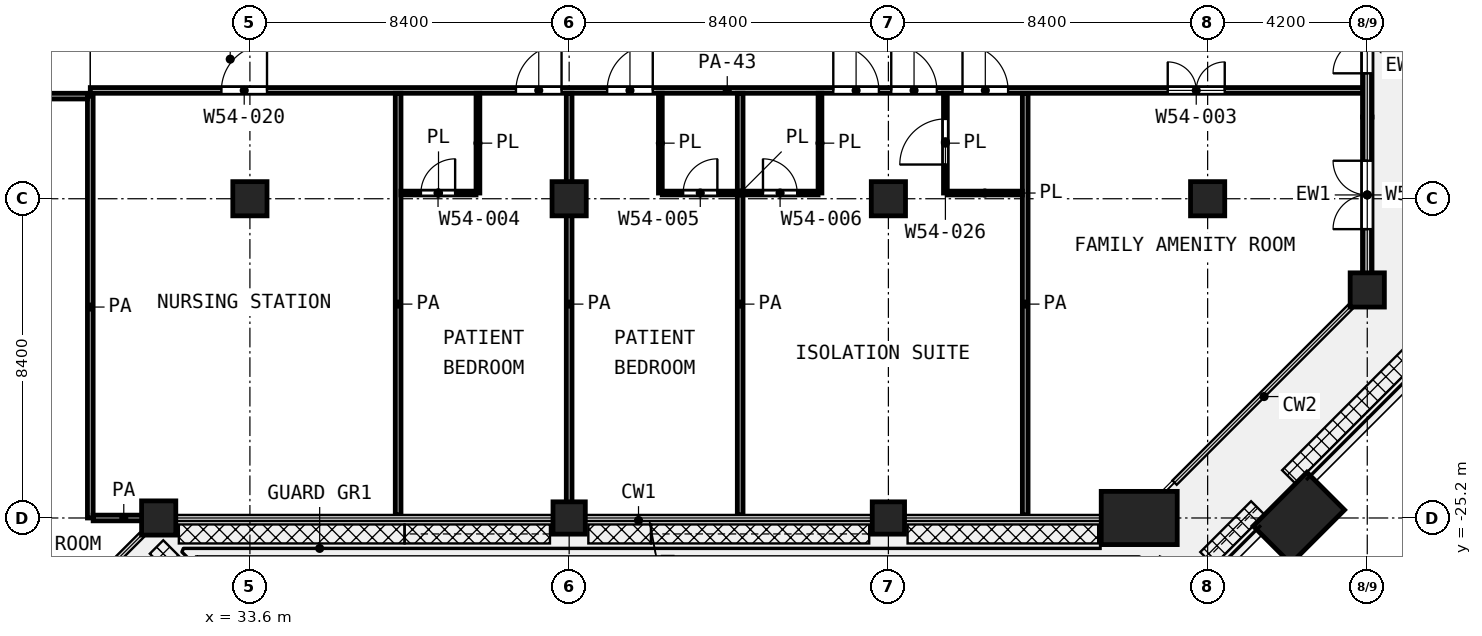
"""IFC4 building model, lengths in metres.
Left out: names, types, materials, properties, quantities, classifications, styles, units other than length and angle.
Written with IfcOpenShell. Run it as: python <this file> out.ifc"""

import sys

from ifc_helpers import new_model, si_unit, direction, frame, frame_2d, origin, origin_2d, place, context, subcontext, project, spatial, rectangle, extrude, element, fill, save


model = new_model("IFC4")
c1 = context("Model", 3, precision=1e-05, world=origin(), true_north=direction((0.0, 1.0)))
c2 = subcontext(c1, "Body", "Model", "MODEL_VIEW")
j1 = project(units=[si_unit("LENGTHUNIT", "METRE"), si_unit("PLANEANGLEUNIT", "RADIAN")], contexts=[c1])
p1 = place(None, origin())
s1 = spatial("IfcSite", under=j1, at=p1, CompositionType="ELEMENT")
p2 = place(p1, origin())
s2 = spatial("IfcBuilding", under=s1, at=p2, CompositionType="ELEMENT")
p3 = place(p2, frame((0.0, 0.0, 234.8)))
s3 = spatial("IfcBuildingStorey", under=s2, at=p3, CompositionType="ELEMENT", Elevation=234.8)
for number, where, z_axis, x_axis in (
    (1, (33.6, -16.8, 0.0), (0.0, 0.0, 1.0), (1.0, 0.0, 0.0)),
    (2, (42.0, -16.8, 0.0), (0.0, 0.0, 1.0), (1.0, 0.0, 0.0)),
    (3, (50.4, -16.8, 0.0), (0.0, 0.0, 1.0), (1.0, 0.0, 0.0)),
    (4, (58.8, -16.8, 0.0), (0.0, 0.0, 1.0), (1.0, 0.0, 0.0)),
    (5, (63.0, -19.2, 0.0), (0.0, 0.0, 1.0), (1.0, 0.0, 0.0)),
    (6, (31.2, -25.2, 0.0), (0.0, 0.0, 1.0), (1.0, 0.0, 0.0)),
):
    element("IfcColumn", number, at=place(p3, frame(where, z_axis=z_axis, x_axis=x_axis)), inside=s3, PredefinedType="COLUMN", context=c2, shape_type="SweptSolid", body=[
        extrude(rectangle(XDim=0.9, YDim=0.9, at=origin_2d()), origin(), (0.0, 0.0, 1.0), 4.2),
    ])
for number, where, z_axis, x_axis in (
    (7, (42.0, -25.2, 0.0), (0.0, 0.0, 1.0), (1.0, 0.0, 0.0)),
    (8, (50.4, -25.2, 0.0), (0.0, 0.0, 1.0), (1.0, 0.0, 0.0)),
):
    element("IfcColumn", number, at=place(p3, frame(where, z_axis=z_axis, x_axis=x_axis)), inside=s3, PredefinedType="COLUMN", context=c2, shape_type="SweptSolid", body=[
        extrude(rectangle(XDim=0.85, YDim=0.85, at=origin_2d()), origin(), (0.0, 0.0, 1.0), 4.2),
    ])
for number, where, z_axis, x_axis in (
    (9, (57.0, -25.2, 0.0), (0.0, 0.0, 1.0), (-1.0, 0.0, 0.0)),
    (10, (61.2, -25.2, 0.0), (0.0, 0.0, 1.0), (-0.707, -0.707, 0.0)),
):
    element("IfcColumn", number, at=place(p3, frame(where, z_axis=z_axis, x_axis=x_axis)), inside=s3, PredefinedType="COLUMN", context=c2, shape_type="SweptSolid", body=[
        extrude(rectangle(XDim=2.0, YDim=1.4, at=origin_2d()), origin(), (0.0, 0.0, 1.0), 4.2),
    ])
p4 = place(p3, frame((63.0, -18.75, 0.0), z_axis=(0.0, 0.0, 1.0), x_axis=(0.0, 1.0, 0.0)))
e11 = element("IfcWall", 11, at=p4, inside=s3, PredefinedType="SOLIDWALL", context=c2, shape_type="SweptSolid", body=[
    extrude(rectangle(XDim=4.1, YDim=0.25, at=frame_2d((2.05, 0.0))), origin(), (0.0, 0.0, 1.0), 2.58),
])
p5 = place(p4, frame((1.15, 0.0, 0.0)))
e12 = element("IfcOpeningElement", 12, at=p5, cuts=e11, PredefinedType="OPENING", context=c2, shape_type="SweptSolid", body=[
    extrude(rectangle(XDim=1.8, YDim=2.1, at=frame_2d((0.9, 1.05))), frame((0.0, 0.135, 0.0), z_axis=(0.0, -1.0, 0.0), x_axis=(1.0, 0.0, 0.0)), (0.0, 0.0, 1.0), 0.27),
])
p6 = place(p3, frame((63.0, -14.65, 0.0), z_axis=(0.0, 0.0, 1.0), x_axis=(0.0, 1.0, 0.0)))
e13 = element("IfcWall", 13, at=p6, inside=s3, PredefinedType="SOLIDWALL", context=c2, shape_type="SweptSolid", body=[
    extrude(rectangle(XDim=4.1, YDim=0.25, at=frame_2d((2.05, 0.0))), origin(), (0.0, 0.0, 1.0), 2.58),
])
p7 = place(p6, frame((1.15, 0.0, 0.0)))
e14 = element("IfcOpeningElement", 14, at=p7, cuts=e13, PredefinedType="OPENING", context=c2, shape_type="SweptSolid", body=[
    extrude(rectangle(XDim=1.8, YDim=2.1, at=frame_2d((0.9, 1.05))), frame((0.0, 0.135, 0.0), z_axis=(0.0, -1.0, 0.0), x_axis=(1.0, 0.0, 0.0)), (0.0, 0.0, 1.0), 0.27),
])
p8 = place(p3, frame((37.575, -16.65, 0.0), z_axis=(0.0, 0.0, 1.0), x_axis=(1.0, 0.0, 0.0)))
e15 = element("IfcWall", 15, at=p8, inside=s3, PredefinedType="PARTITIONING", context=c2, shape_type="SweptSolid", body=[
    extrude(rectangle(XDim=1.975, YDim=0.1, at=frame_2d((0.988, 0.0))), origin(), (0.0, 0.0, 1.0), 3.6),
])
p9 = place(p8, frame((0.525, 0.0, 0.0)))
e16 = element("IfcOpeningElement", 16, at=p9, cuts=e15, PredefinedType="OPENING", context=c2, shape_type="SweptSolid", body=[
    extrude(rectangle(XDim=0.9, YDim=2.1, at=frame_2d((0.45, 1.05))), frame((0.0, 0.06, 0.0), z_axis=(0.0, -1.0, 0.0), x_axis=(1.0, 0.0, 0.0)), (0.0, 0.0, 1.0), 0.12),
])
p10 = place(p3, frame((44.45, -16.65, 0.0), z_axis=(0.0, 0.0, 1.0), x_axis=(1.0, 0.0, 0.0)))
e17 = element("IfcWall", 17, at=p10, inside=s3, PredefinedType="PARTITIONING", context=c2, shape_type="SweptSolid", body=[
    extrude(rectangle(XDim=4.1, YDim=0.1, at=frame_2d((2.05, 0.0))), origin(), (0.0, 0.0, 1.0), 3.6),
])
p11 = place(p10, frame((0.55, 0.0, 0.0)))
e18 = element("IfcOpeningElement", 18, at=p11, cuts=e17, PredefinedType="OPENING", context=c2, shape_type="SweptSolid", body=[
    extrude(rectangle(XDim=0.9, YDim=2.1, at=frame_2d((0.45, 1.05))), frame((0.0, 0.06, 0.0), z_axis=(0.0, -1.0, 0.0), x_axis=(1.0, 0.0, 0.0)), (0.0, 0.0, 1.0), 0.12),
])
p12 = place(p10, frame((2.65, 0.0, 0.0)))
e19 = element("IfcOpeningElement", 19, at=p12, cuts=e17, PredefinedType="OPENING", context=c2, shape_type="SweptSolid", body=[
    extrude(rectangle(XDim=0.9, YDim=2.1, at=frame_2d((0.45, 1.05))), frame((0.0, 0.06, 0.0), z_axis=(0.0, -1.0, 0.0), x_axis=(1.0, 0.0, 0.0)), (0.0, 0.0, 1.0), 0.12),
])
p13 = place(p3, frame((51.95, -16.65, 0.0), z_axis=(0.0, 0.0, 1.0), x_axis=(1.0, 0.0, 0.0)))
e20 = element("IfcWall", 20, at=p13, inside=s3, PredefinedType="PARTITIONING", context=c2, shape_type="SweptSolid", body=[
    extrude(rectangle(XDim=1.975, YDim=0.1, at=frame_2d((0.988, 0.0))), origin(), (0.0, 0.0, 1.0), 3.6),
])
for number, where, z_axis, x_axis in (
    (21, (39.6, -16.65, 0.0), (0.0, 0.0, 1.0), (0.0, 1.0, 0.0)),
    (22, (44.4, -16.65, 0.0), (0.0, 0.0, 1.0), (0.0, 1.0, 0.0)),
    (23, (48.6, -16.65, 0.0), (0.0, 0.0, 1.0), (0.0, 1.0, 0.0)),
):
    element("IfcWall", number, at=place(p3, frame(where, z_axis=z_axis, x_axis=x_axis)), inside=s3, PredefinedType="PARTITIONING", context=c2, shape_type="SweptSolid", body=[
        extrude(rectangle(XDim=2.625, YDim=0.1, at=frame_2d((1.312, 0.0))), origin(), (0.0, 0.0, 1.0), 3.6),
    ])
p14 = place(p3, frame((51.9, -16.65, 0.0), z_axis=(0.0, 0.0, 1.0), x_axis=(0.0, 1.0, 0.0)))
e24 = element("IfcWall", 24, at=p14, inside=s3, PredefinedType="PARTITIONING", context=c2, shape_type="SweptSolid", body=[
    extrude(rectangle(XDim=2.625, YDim=0.1, at=frame_2d((1.312, 0.0))), origin(), (0.0, 0.0, 1.0), 3.6),
])
p15 = place(p14, frame((0.75, 0.0, 0.0)))
e25 = element("IfcOpeningElement", 25, at=p15, cuts=e24, PredefinedType="OPENING", context=c2, shape_type="SweptSolid", body=[
    extrude(rectangle(XDim=1.2, YDim=2.1, at=frame_2d((0.6, 1.05))), frame((0.0, 0.06, 0.0), z_axis=(0.0, -1.0, 0.0), x_axis=(1.0, 0.0, 0.0)), (0.0, 0.0, 1.0), 0.12),
])
p16 = place(p3, frame((29.475, -25.2, 0.0), z_axis=(0.0, 0.0, 1.0), x_axis=(1.0, 0.0, 0.0)))
e26 = element("IfcWall", 26, at=p16, inside=s3, PredefinedType="PARTITIONING", context=c2, shape_type="SweptSolid", body=[
    extrude(rectangle(XDim=1.612, YDim=0.15, at=frame_2d((0.806, 0.0))), origin(), (0.0, 0.0, 1.0), 3.6),
])
p17 = place(p3, frame((24.8, -14.1, 0.0), z_axis=(0.0, 0.0, 1.0), x_axis=(1.0, 0.0, 0.0)))
e27 = element("IfcWall", 27, at=p17, inside=s3, PredefinedType="PARTITIONING", context=c2, shape_type="SweptSolid", body=[
    extrude(rectangle(XDim=4.525, YDim=0.15, at=frame_2d((2.262, 0.0))), origin(), (0.0, 0.0, 1.0), 3.6),
])
p18 = place(p17, frame((1.75, 0.0, 0.0)))
e28 = element("IfcOpeningElement", 28, at=p18, cuts=e27, PredefinedType="OPENING", context=c2, shape_type="SweptSolid", body=[
    extrude(rectangle(XDim=1.5, YDim=2.1, at=frame_2d((0.75, 1.05))), frame((0.0, 0.085, 0.0), z_axis=(0.0, -1.0, 0.0), x_axis=(1.0, 0.0, 0.0)), (0.0, 0.0, 1.0), 0.17),
])
p19 = place(p3, frame((29.4, -13.95, 0.0), z_axis=(0.0, 0.0, 1.0), x_axis=(1.0, 0.0, 0.0)))
e29 = element("IfcWall", 29, at=p19, inside=s3, PredefinedType="PARTITIONING", context=c2, shape_type="SweptSolid", body=[
    extrude(rectangle(XDim=33.52, YDim=0.15, at=frame_2d((16.76, 0.0))), origin(), (0.0, 0.0, 1.0), 2.7),
])
p20 = place(p19, frame((3.45, 0.0, 0.0)))
e30 = element("IfcOpeningElement", 30, at=p20, cuts=e29, PredefinedType="OPENING", context=c2, shape_type="SweptSolid", body=[
    extrude(rectangle(XDim=1.2, YDim=2.1, at=frame_2d((0.6, 1.05))), frame((0.0, 0.085, 0.0), z_axis=(0.0, -1.0, 0.0), x_axis=(1.0, 0.0, 0.0)), (0.0, 0.0, 1.0), 0.17),
])
p21 = place(p19, frame((11.2, 0.0, 0.0)))
e31 = element("IfcOpeningElement", 31, at=p21, cuts=e29, PredefinedType="OPENING", context=c2, shape_type="SweptSolid", body=[
    extrude(rectangle(XDim=1.2, YDim=2.1, at=frame_2d((0.6, 1.05))), frame((0.0, 0.085, 0.0), z_axis=(0.0, -1.0, 0.0), x_axis=(1.0, 0.0, 0.0)), (0.0, 0.0, 1.0), 0.17),
])
p22 = place(p19, frame((13.6, 0.0, 0.0)))
e32 = element("IfcOpeningElement", 32, at=p22, cuts=e29, PredefinedType="OPENING", context=c2, shape_type="SweptSolid", body=[
    extrude(rectangle(XDim=1.2, YDim=2.1, at=frame_2d((0.6, 1.05))), frame((0.0, 0.085, 0.0), z_axis=(0.0, -1.0, 0.0), x_axis=(1.0, 0.0, 0.0)), (0.0, 0.0, 1.0), 0.17),
])
p23 = place(p19, frame((21.075, 0.0, 0.0)))
e33 = element("IfcOpeningElement", 33, at=p23, cuts=e29, PredefinedType="OPENING", context=c2, shape_type="SweptSolid", body=[
    extrude(rectangle(XDim=1.2, YDim=2.1, at=frame_2d((0.6, 1.05))), frame((0.0, 0.085, 0.0), z_axis=(0.0, -1.0, 0.0), x_axis=(1.0, 0.0, 0.0)), (0.0, 0.0, 1.0), 0.17),
])
p24 = place(p19, frame((19.55, 0.0, 0.0)))
e34 = element("IfcOpeningElement", 34, at=p24, cuts=e29, PredefinedType="OPENING", context=c2, shape_type="SweptSolid", body=[
    extrude(rectangle(XDim=1.2, YDim=2.1, at=frame_2d((0.6, 1.05))), frame((0.0, 0.085, 0.0), z_axis=(0.0, -1.0, 0.0), x_axis=(1.0, 0.0, 0.0)), (0.0, 0.0, 1.0), 0.17),
])
p25 = place(p19, frame((22.95, 0.0, 0.0)))
e35 = element("IfcOpeningElement", 35, at=p25, cuts=e29, PredefinedType="OPENING", context=c2, shape_type="SweptSolid", body=[
    extrude(rectangle(XDim=1.2, YDim=2.1, at=frame_2d((0.6, 1.05))), frame((0.0, 0.085, 0.0), z_axis=(0.0, -1.0, 0.0), x_axis=(1.0, 0.0, 0.0)), (0.0, 0.0, 1.0), 0.17),
])
p26 = place(p19, frame((28.35, 0.0, 0.0)))
e36 = element("IfcOpeningElement", 36, at=p26, cuts=e29, PredefinedType="OPENING", context=c2, shape_type="SweptSolid", body=[
    extrude(rectangle(XDim=1.5, YDim=2.1, at=frame_2d((0.75, 1.05))), frame((0.0, 0.085, 0.0), z_axis=(0.0, -1.0, 0.0), x_axis=(1.0, 0.0, 0.0)), (0.0, 0.0, 1.0), 0.17),
])
p27 = place(p3, frame((29.4, -25.2, 0.0), z_axis=(0.0, 0.0, 1.0), x_axis=(0.0, 1.0, 0.0)))
e37 = element("IfcWall", 37, at=p27, inside=s3, PredefinedType="PARTITIONING", context=c2, shape_type="SweptSolid", body=[
    extrude(rectangle(XDim=11.1, YDim=0.15, at=frame_2d((5.55, 0.0))), origin(), (0.0, 0.0, 1.0), 3.6),
])
for number, where, z_axis, x_axis in (
    (38, (37.5, -25.12, 0.0), (0.0, 0.0, 1.0), (0.0, 1.0, 0.0)),
    (39, (42.0, -25.12, 0.0), (0.0, 0.0, 1.0), (0.0, 1.0, 0.0)),
    (40, (46.5, -25.12, 0.0), (0.0, 0.0, 1.0), (0.0, 1.0, 0.0)),
    (41, (54.0, -25.12, 0.0), (0.0, 0.0, 1.0), (0.0, 1.0, 0.0)),
):
    element("IfcWall", number, at=place(p3, frame(where, z_axis=z_axis, x_axis=x_axis)), inside=s3, PredefinedType="PARTITIONING", context=c2, shape_type="SweptSolid", body=[
        extrude(rectangle(XDim=11.095, YDim=0.15, at=frame_2d((5.548, 0.0))), origin(), (0.0, 0.0, 1.0), 3.6),
    ])
p28 = place(p5, origin())
e42 = element("IfcDoor", 42, at=p28, inside=s3, OperationType="DOUBLE_DOOR_SINGLE_SWING", PredefinedType="DOOR", context=c2, shape_type="SweptSolid", body=[
    extrude(rectangle(XDim=1.8, YDim=2.1, at=frame_2d((0.9, 1.05))), frame((0.0, 0.025, 0.0), z_axis=(0.0, -1.0, 0.0), x_axis=(1.0, 0.0, 0.0)), (0.0, 0.0, 1.0), 0.05),
])
fill(e12, e42)
p29 = place(p7, origin())
e43 = element("IfcDoor", 43, at=p29, inside=s3, OperationType="DOUBLE_DOOR_SINGLE_SWING", PredefinedType="DOOR", context=c2, shape_type="SweptSolid", body=[
    extrude(rectangle(XDim=1.8, YDim=2.1, at=frame_2d((0.9, 1.05))), frame((0.0, 0.025, 0.0), z_axis=(0.0, -1.0, 0.0), x_axis=(1.0, 0.0, 0.0)), (0.0, 0.0, 1.0), 0.05),
])
fill(e14, e43)
p30 = place(p20, origin())
e44 = element("IfcDoor", 44, at=p30, inside=s3, OperationType="SINGLE_SWING_RIGHT", PredefinedType="DOOR", context=c2, shape_type="SweptSolid", body=[
    extrude(rectangle(XDim=1.2, YDim=2.1, at=frame_2d((0.6, 1.05))), frame((0.0, 0.025, 0.0), z_axis=(0.0, -1.0, 0.0), x_axis=(1.0, 0.0, 0.0)), (0.0, 0.0, 1.0), 0.05),
])
fill(e30, e44)
p31 = place(p21, origin())
e45 = element("IfcDoor", 45, at=p31, inside=s3, OperationType="SINGLE_SWING_RIGHT", PredefinedType="DOOR", context=c2, shape_type="SweptSolid", body=[
    extrude(rectangle(XDim=1.2, YDim=2.1, at=frame_2d((0.6, 1.05))), frame((0.0, 0.025, 0.0), z_axis=(0.0, -1.0, 0.0), x_axis=(1.0, 0.0, 0.0)), (0.0, 0.0, 1.0), 0.05),
])
fill(e31, e45)
p32 = place(p9, origin())
e46 = element("IfcDoor", 46, at=p32, inside=s3, OperationType="SINGLE_SWING_RIGHT", PredefinedType="DOOR", context=c2, shape_type="SweptSolid", body=[
    extrude(rectangle(XDim=0.9, YDim=2.1, at=frame_2d((0.45, 1.05))), frame((0.0, 0.025, 0.0), z_axis=(0.0, -1.0, 0.0), x_axis=(1.0, 0.0, 0.0)), (0.0, 0.0, 1.0), 0.05),
])
fill(e16, e46)
p33 = place(p22, origin())
e47 = element("IfcDoor", 47, at=p33, inside=s3, OperationType="SINGLE_SWING_RIGHT", PredefinedType="DOOR", context=c2, shape_type="SweptSolid", body=[
    extrude(rectangle(XDim=1.2, YDim=2.1, at=frame_2d((0.6, 1.05))), frame((0.0, 0.025, 0.0), z_axis=(0.0, -1.0, 0.0), x_axis=(1.0, 0.0, 0.0)), (0.0, 0.0, 1.0), 0.05),
])
fill(e32, e47)
p34 = place(p11, origin())
e48 = element("IfcDoor", 48, at=p34, inside=s3, OperationType="SINGLE_SWING_RIGHT", PredefinedType="DOOR", context=c2, shape_type="SweptSolid", body=[
    extrude(rectangle(XDim=0.9, YDim=2.1, at=frame_2d((0.45, 1.05))), frame((0.0, 0.025, 0.0), z_axis=(0.0, -1.0, 0.0), x_axis=(1.0, 0.0, 0.0)), (0.0, 0.0, 1.0), 0.05),
])
fill(e18, e48)
p35 = place(p23, origin())
e49 = element("IfcDoor", 49, at=p35, inside=s3, OperationType="SINGLE_SWING_LEFT", PredefinedType="DOOR", context=c2, shape_type="SweptSolid", body=[
    extrude(rectangle(XDim=1.2, YDim=2.1, at=frame_2d((0.6, 1.05))), frame((0.0, 0.025, 0.0), z_axis=(0.0, -1.0, 0.0), x_axis=(1.0, 0.0, 0.0)), (0.0, 0.0, 1.0), 0.05),
])
fill(e33, e49)
p36 = place(p24, origin())
e50 = element("IfcDoor", 50, at=p36, inside=s3, OperationType="SINGLE_SWING_LEFT", PredefinedType="DOOR", context=c2, shape_type="SweptSolid", body=[
    extrude(rectangle(XDim=1.2, YDim=2.1, at=frame_2d((0.6, 1.05))), frame((0.0, 0.025, 0.0), z_axis=(0.0, -1.0, 0.0), x_axis=(1.0, 0.0, 0.0)), (0.0, 0.0, 1.0), 0.05),
])
fill(e34, e50)
p37 = place(p25, origin())
e51 = element("IfcDoor", 51, at=p37, inside=s3, OperationType="SINGLE_SWING_LEFT", PredefinedType="DOOR", context=c2, shape_type="SweptSolid", body=[
    extrude(rectangle(XDim=1.2, YDim=2.1, at=frame_2d((0.6, 1.05))), frame((0.0, 0.025, 0.0), z_axis=(0.0, -1.0, 0.0), x_axis=(1.0, 0.0, 0.0)), (0.0, 0.0, 1.0), 0.05),
])
fill(e35, e51)
p38 = place(p15, origin())
e52 = element("IfcDoor", 52, at=p38, inside=s3, OperationType="SINGLE_SWING_LEFT", PredefinedType="DOOR", context=c2, shape_type="SweptSolid", body=[
    extrude(rectangle(XDim=1.2, YDim=2.1, at=frame_2d((0.6, 1.05))), frame((0.0, 0.025, 0.0), z_axis=(0.0, -1.0, 0.0), x_axis=(1.0, 0.0, 0.0)), (0.0, 0.0, 1.0), 0.05),
])
fill(e25, e52)
p39 = place(p12, origin())
e53 = element("IfcDoor", 53, at=p39, inside=s3, OperationType="SINGLE_SWING_LEFT", PredefinedType="DOOR", context=c2, shape_type="SweptSolid", body=[
    extrude(rectangle(XDim=0.9, YDim=2.1, at=frame_2d((0.45, 1.05))), frame((0.0, 0.025, 0.0), z_axis=(0.0, -1.0, 0.0), x_axis=(1.0, 0.0, 0.0)), (0.0, 0.0, 1.0), 0.05),
])
fill(e19, e53)
p40 = place(p26, origin())
e54 = element("IfcDoor", 54, at=p40, inside=s3, OperationType="DOUBLE_DOOR_SINGLE_SWING", PredefinedType="DOOR", context=c2, shape_type="SweptSolid", body=[
    extrude(rectangle(XDim=1.5, YDim=2.1, at=frame_2d((0.75, 1.05))), frame((0.0, 0.025, 0.0), z_axis=(0.0, -1.0, 0.0), x_axis=(1.0, 0.0, 0.0)), (0.0, 0.0, 1.0), 0.05),
])
fill(e36, e54)
save(model, sys.argv[1])
